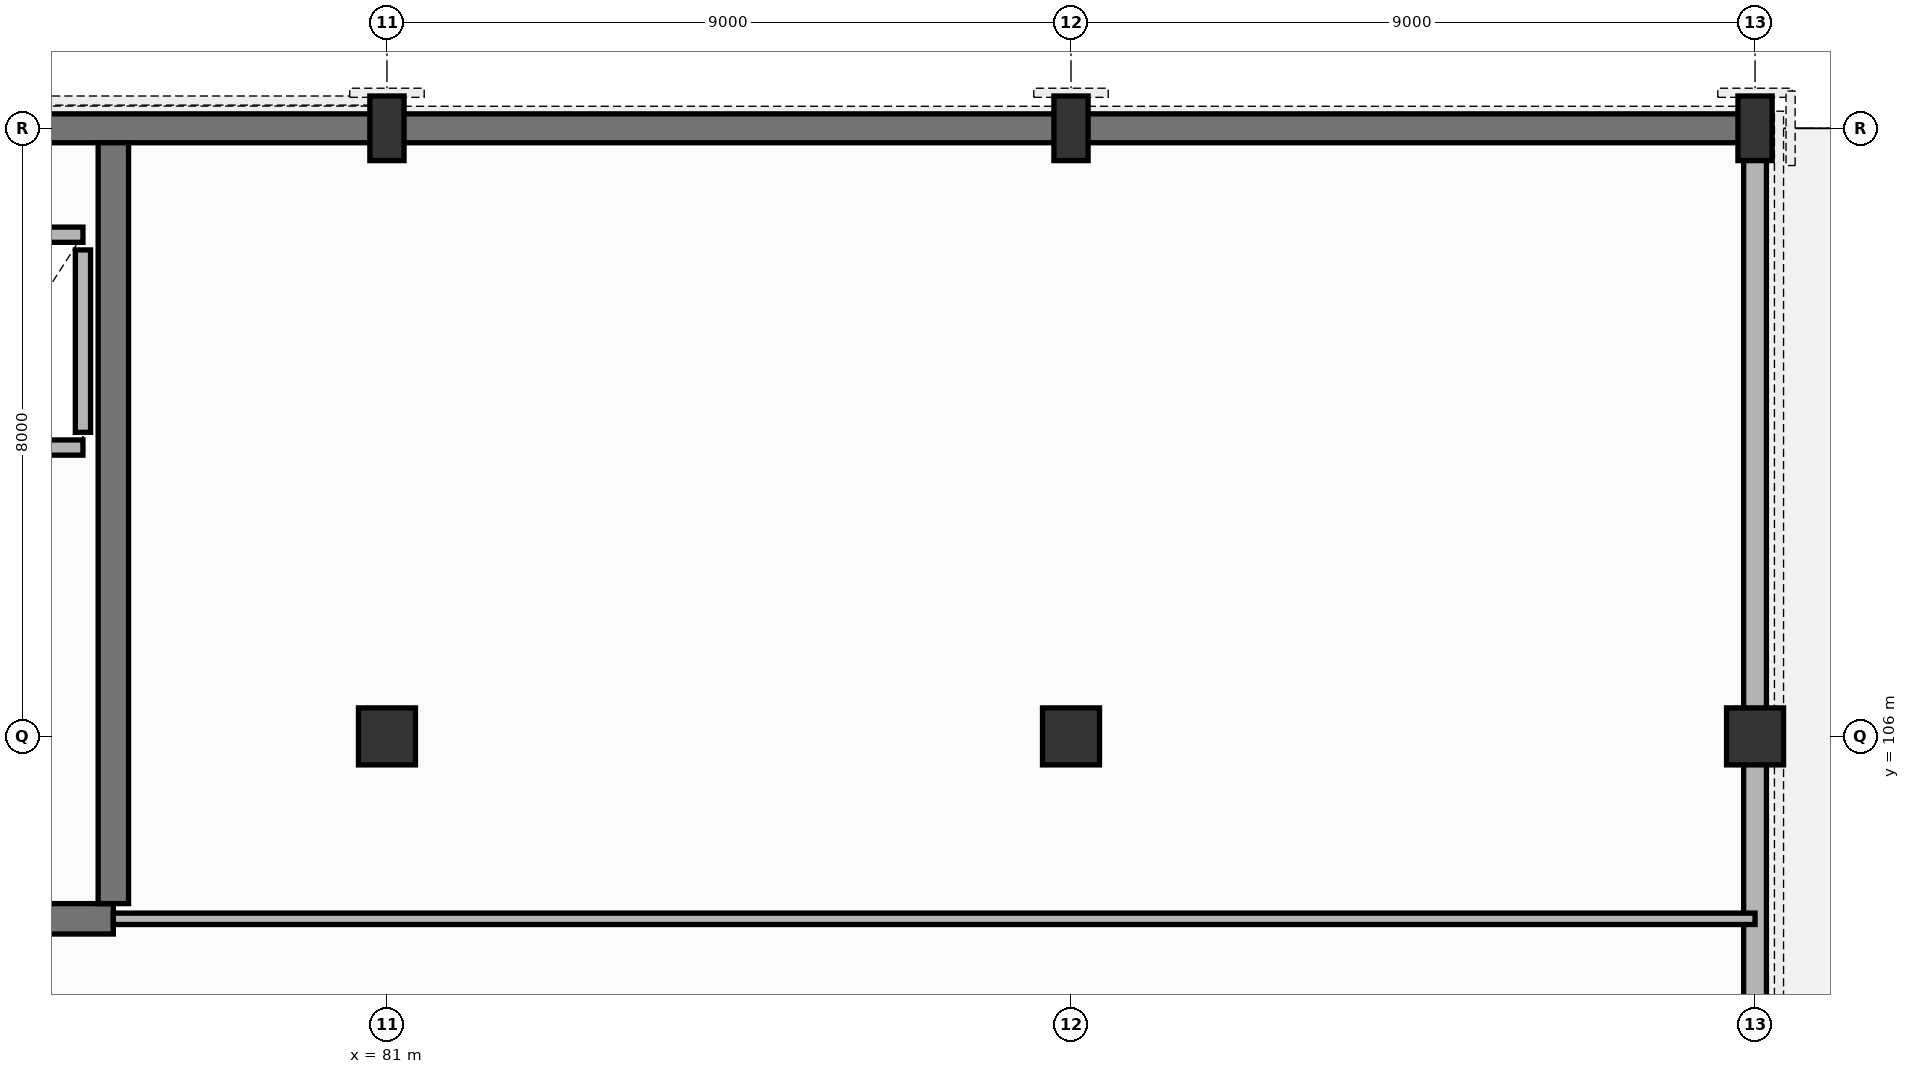
"""IFC4 building model, lengths in metres.
Left out: names, types, materials, properties, quantities, classifications, styles, units other than length and angle.
Written with IfcOpenShell. Run it as: python <this file> out.ifc"""

import sys

from ifc_helpers import new_model, si_unit, direction, frame, frame_2d, origin, origin_2d, place, context, subcontext, project, spatial, rectangle, extrude, element, fill, save


model = new_model("IFC4")
c1 = context("Model", 3, precision=1e-05, world=origin(), true_north=direction((0.0, 1.0)))
c2 = subcontext(c1, "Body", "Model", "MODEL_VIEW")
j1 = project(units=[si_unit("LENGTHUNIT", "METRE"), si_unit("PLANEANGLEUNIT", "RADIAN")], contexts=[c1])
p1 = place(None, origin())
s1 = spatial("IfcSite", under=j1, at=p1, CompositionType="ELEMENT")
p2 = place(p1, origin())
s2 = spatial("IfcBuilding", under=s1, at=p2, CompositionType="ELEMENT")
p3 = place(p2, frame((0.0, 0.0, 8.94)))
s3 = spatial("IfcBuildingStorey", under=s2, at=p3, CompositionType="ELEMENT", Elevation=8.94)
p4 = place(p3, frame((81.0, 106.0, 0.0), z_axis=(0.0, 0.0, 1.0), x_axis=(1.0, 0.0, 0.0)))
e1 = element("IfcColumn", 1, at=p4, inside=s3, PredefinedType="COLUMN", context=c2, shape_type="SweptSolid", body=[
    extrude(rectangle(XDim=0.75, YDim=0.75, at=origin_2d()), origin(), (0.0, 0.0, 1.0), 3.84),
])
p5 = place(p3, frame((81.0, 114.0, 0.0), z_axis=(0.0, 0.0, 1.0), x_axis=(0.0, 1.0, 0.0)))
e2 = element("IfcColumn", 2, at=p5, inside=s3, PredefinedType="COLUMN", context=c2, shape_type="SweptSolid", body=[
    extrude(rectangle(XDim=0.45, YDim=0.85, at=origin_2d()), origin(), (0.0, 0.0, 1.0), 3.84),
])
p6 = place(p3, frame((90.0, 106.0, 0.0), z_axis=(0.0, 0.0, 1.0), x_axis=(1.0, 0.0, 0.0)))
e3 = element("IfcColumn", 3, at=p6, inside=s3, PredefinedType="COLUMN", context=c2, shape_type="SweptSolid", body=[
    extrude(rectangle(XDim=0.75, YDim=0.75, at=origin_2d()), origin(), (0.0, 0.0, 1.0), 3.84),
])
p7 = place(p3, frame((90.0, 114.0, 0.0), z_axis=(0.0, 0.0, 1.0), x_axis=(0.0, 1.0, 0.0)))
e4 = element("IfcColumn", 4, at=p7, inside=s3, PredefinedType="COLUMN", context=c2, shape_type="SweptSolid", body=[
    extrude(rectangle(XDim=0.45, YDim=0.85, at=origin_2d()), origin(), (0.0, 0.0, 1.0), 3.84),
])
p8 = place(p3, frame((99.0, 106.0, 0.0), z_axis=(0.0, 0.0, 1.0), x_axis=(1.0, 0.0, 0.0)))
e5 = element("IfcColumn", 5, at=p8, inside=s3, PredefinedType="COLUMN", context=c2, shape_type="SweptSolid", body=[
    extrude(rectangle(XDim=0.75, YDim=0.75, at=origin_2d()), origin(), (0.0, 0.0, 1.0), 3.84),
])
p9 = place(p3, frame((99.0, 114.0, 0.0), z_axis=(0.0, 0.0, 1.0), x_axis=(0.0, 1.0, 0.0)))
e6 = element("IfcColumn", 6, at=p9, inside=s3, PredefinedType="COLUMN", context=c2, shape_type="SweptSolid", body=[
    extrude(rectangle(XDim=0.45, YDim=0.85, at=origin_2d()), origin(), (0.0, 0.0, 1.0), 3.84),
])
p10 = place(p3, frame((72.0, 114.0, 0.0), z_axis=(0.0, 0.0, 1.0), x_axis=(1.0, 0.0, 0.0)))
e7 = element("IfcWall", 7, at=p10, inside=s3, PredefinedType="SOLIDWALL", context=c2, shape_type="SweptSolid", body=[
    extrude(rectangle(XDim=9.0, YDim=0.38, at=frame_2d((4.5, 0.0))), origin(), (0.0, 0.0, 1.0), 3.53),
])
p11 = place(p3, frame((81.0, 114.0, 0.0), z_axis=(0.0, 0.0, 1.0), x_axis=(1.0, 0.0, 0.0)))
e8 = element("IfcWall", 8, at=p11, inside=s3, PredefinedType="SOLIDWALL", context=c2, shape_type="SweptSolid", body=[
    extrude(rectangle(XDim=9.0, YDim=0.38, at=frame_2d((4.5, 0.0))), origin(), (0.0, 0.0, 1.0), 3.53),
])
p12 = place(p11, frame((2.2, 0.0, 0.615)))
e9 = element("IfcOpeningElement", 9, at=p12, cuts=e8, PredefinedType="OPENING", context=c2, shape_type="SweptSolid", body=[
    extrude(rectangle(XDim=0.82, YDim=2.15, at=frame_2d((0.41, 1.075))), frame((0.0, 0.2, 0.0), z_axis=(0.0, -1.0, 0.0), x_axis=(1.0, 0.0, 0.0)), (0.0, 0.0, 1.0), 0.4),
])
p13 = place(p11, frame((5.4, 0.0, 0.465)))
e10 = element("IfcOpeningElement", 10, at=p13, cuts=e8, PredefinedType="OPENING", context=c2, shape_type="SweptSolid", body=[
    extrude(rectangle(XDim=1.15, YDim=2.3, at=frame_2d((0.575, 1.15))), frame((0.0, 0.2, 0.0), z_axis=(0.0, -1.0, 0.0), x_axis=(1.0, 0.0, 0.0)), (0.0, 0.0, 1.0), 0.4),
])
p14 = place(p3, frame((90.0, 114.0, 0.0), z_axis=(0.0, 0.0, 1.0), x_axis=(1.0, 0.0, 0.0)))
e11 = element("IfcWall", 11, at=p14, inside=s3, PredefinedType="SOLIDWALL", context=c2, shape_type="SweptSolid", body=[
    extrude(rectangle(XDim=9.0, YDim=0.38, at=frame_2d((4.5, 0.0))), origin(), (0.0, 0.0, 1.0), 3.53),
])
p15 = place(p14, frame((2.2, 0.0, 0.605)))
e12 = element("IfcOpeningElement", 12, at=p15, cuts=e11, PredefinedType="OPENING", context=c2, shape_type="SweptSolid", body=[
    extrude(rectangle(XDim=0.82, YDim=2.15, at=frame_2d((0.41, 1.075))), frame((0.0, 0.2, 0.0), z_axis=(0.0, -1.0, 0.0), x_axis=(1.0, 0.0, 0.0)), (0.0, 0.0, 1.0), 0.4),
])
p16 = place(p14, frame((5.4, 0.0, 0.455)))
e13 = element("IfcOpeningElement", 13, at=p16, cuts=e11, PredefinedType="OPENING", context=c2, shape_type="SweptSolid", body=[
    extrude(rectangle(XDim=1.15, YDim=2.3, at=frame_2d((0.575, 1.15))), frame((0.0, 0.2, 0.0), z_axis=(0.0, -1.0, 0.0), x_axis=(1.0, 0.0, 0.0)), (0.0, 0.0, 1.0), 0.4),
])
p17 = place(p3, frame((99.0, 82.2, 0.0), z_axis=(0.0, 0.0, 1.0), x_axis=(0.0, 1.0, 0.0)))
e14 = element("IfcWall", 14, at=p17, inside=s3, PredefinedType="SOLIDWALL", context=c2, shape_type="SweptSolid", body=[
    extrude(rectangle(XDim=31.8, YDim=0.3, at=frame_2d((15.9, 0.0))), origin(), (0.0, 0.0, 1.0), 2.695),
])
p18 = place(p17, frame((18.2, 0.0, 0.0)))
e15 = element("IfcOpeningElement", 15, at=p18, cuts=e14, PredefinedType="OPENING", context=c2, shape_type="SweptSolid", body=[
    extrude(rectangle(XDim=1.6, YDim=2.25, at=frame_2d((0.8, 1.125))), frame((0.0, 0.16, 0.0), z_axis=(0.0, -1.0, 0.0), x_axis=(1.0, 0.0, 0.0)), (0.0, 0.0, 1.0), 0.32),
])
p19 = place(p17, frame((3.2, 0.0, 0.475)))
e16 = element("IfcOpeningElement", 16, at=p19, cuts=e14, PredefinedType="OPENING", context=c2, shape_type="SweptSolid", body=[
    extrude(rectangle(XDim=1.5, YDim=2.1, at=frame_2d((0.75, 1.05))), frame((0.0, 0.16, 0.0), z_axis=(0.0, -1.0, 0.0), x_axis=(1.0, 0.0, 0.0)), (0.0, 0.0, 1.0), 0.32),
])
p20 = place(p17, frame((9.2, 0.0, 0.825)))
e17 = element("IfcOpeningElement", 17, at=p20, cuts=e14, PredefinedType="OPENING", context=c2, shape_type="SweptSolid", body=[
    extrude(rectangle(XDim=1.05, YDim=1.75, at=frame_2d((0.525, 0.875))), frame((0.0, 0.16, 0.0), z_axis=(0.0, -1.0, 0.0), x_axis=(1.0, 0.0, 0.0)), (0.0, 0.0, 1.0), 0.32),
])
p21 = place(p3, frame((64.2, 103.6, 0.0), z_axis=(0.0, 0.0, 1.0), x_axis=(1.0, 0.0, 0.0)))
e18 = element("IfcWall", 18, at=p21, inside=s3, PredefinedType="SHEAR", context=c2, shape_type="SweptSolid", body=[
    extrude(rectangle(XDim=13.2, YDim=0.4, at=frame_2d((6.6, 0.0))), origin(), (0.0, 0.0, 1.0), 3.53),
])
p22 = place(p21, frame((5.8, 0.0, 0.0)))
e19 = element("IfcOpeningElement", 19, at=p22, cuts=e18, PredefinedType="OPENING", context=c2, shape_type="SweptSolid", body=[
    extrude(rectangle(XDim=1.5, YDim=2.2, at=frame_2d((0.75, 1.1))), frame((0.0, 0.21, 0.0), z_axis=(0.0, -1.0, 0.0), x_axis=(1.0, 0.0, 0.0)), (0.0, 0.0, 1.0), 0.42),
])
p23 = place(p3, frame((77.4, 103.8, 0.0), z_axis=(0.0, 0.0, 1.0), x_axis=(0.0, 1.0, 0.0)))
e20 = element("IfcWall", 20, at=p23, inside=s3, PredefinedType="SHEAR", context=c2, shape_type="SweptSolid", body=[
    extrude(rectangle(XDim=10.01, YDim=0.4, at=frame_2d((5.005, 0.0))), origin(), (0.0, 0.0, 1.0), 3.53),
])
p24 = place(p3, frame((75.2, 109.8, 0.0), z_axis=(0.0, 0.0, 1.0), x_axis=(1.0, 0.0, 0.0)))
e21 = element("IfcWall", 21, at=p24, inside=s3, PredefinedType="PARTITIONING", context=c2, shape_type="SweptSolid", body=[
    extrude(rectangle(XDim=1.8, YDim=0.2, at=frame_2d((0.9, 0.0))), origin(), (0.0, 0.0, 1.0), 3.53),
])
p25 = place(p24, frame((0.45, 0.0, 0.0)))
e22 = element("IfcOpeningElement", 22, at=p25, cuts=e21, PredefinedType="OPENING", context=c2, shape_type="SweptSolid", body=[
    extrude(rectangle(XDim=0.9, YDim=2.1, at=frame_2d((0.45, 1.05))), frame((0.0, 0.11, 0.0), z_axis=(0.0, -1.0, 0.0), x_axis=(1.0, 0.0, 0.0)), (0.0, 0.0, 1.0), 0.22),
])
p26 = place(p3, frame((75.2, 112.6, 0.0), z_axis=(0.0, 0.0, 1.0), x_axis=(1.0, 0.0, 0.0)))
e23 = element("IfcWall", 23, at=p26, inside=s3, PredefinedType="PARTITIONING", context=c2, shape_type="SweptSolid", body=[
    extrude(rectangle(XDim=1.8, YDim=0.2, at=frame_2d((0.9, 0.0))), origin(), (0.0, 0.0, 1.0), 3.53),
])
p27 = place(p3, frame((77.0, 110.0, 0.0), z_axis=(0.0, 0.0, 1.0), x_axis=(0.0, 1.0, 0.0)))
e24 = element("IfcWall", 24, at=p27, inside=s3, PredefinedType="PARTITIONING", context=c2, shape_type="SweptSolid", body=[
    extrude(rectangle(XDim=2.4, YDim=0.2, at=frame_2d((1.2, 0.0))), origin(), (0.0, 0.0, 1.0), 3.53),
])
p28 = place(p3, frame((77.4, 103.6, 0.0), z_axis=(0.0, 0.0, 1.0), x_axis=(1.0, 0.0, 0.0)))
e25 = element("IfcWall", 25, at=p28, inside=s3, PredefinedType="PARTITIONING", context=c2, shape_type="SweptSolid", body=[
    extrude(rectangle(XDim=21.6, YDim=0.15, at=frame_2d((10.8, 0.0))), origin(), (0.0, 0.0, 1.0), 3.53),
])
p29 = place(p28, frame((10.1, 0.0, 0.0)))
e26 = element("IfcOpeningElement", 26, at=p29, cuts=e25, PredefinedType="OPENING", context=c2, shape_type="SweptSolid", body=[
    extrude(rectangle(XDim=1.0, YDim=2.15, at=frame_2d((0.5, 1.075))), frame((0.0, 0.085, 0.0), z_axis=(0.0, -1.0, 0.0), x_axis=(1.0, 0.0, 0.0)), (0.0, 0.0, 1.0), 0.17),
])
p30 = place(p12, origin())
e27 = element("IfcWindow", 27, at=p30, inside=s3, PartitioningType="SINGLE_PANEL", PredefinedType="WINDOW", context=c2, shape_type="SweptSolid", body=[
    extrude(rectangle(XDim=0.82, YDim=2.15, at=frame_2d((0.41, 1.075))), frame((0.0, 0.03, 0.0), z_axis=(0.0, -1.0, 0.0), x_axis=(1.0, 0.0, 0.0)), (0.0, 0.0, 1.0), 0.06),
])
fill(e9, e27)
p31 = place(p13, origin())
e28 = element("IfcWindow", 28, at=p31, inside=s3, PartitioningType="SINGLE_PANEL", PredefinedType="WINDOW", context=c2, shape_type="SweptSolid", body=[
    extrude(rectangle(XDim=1.15, YDim=2.3, at=frame_2d((0.575, 1.15))), frame((0.0, 0.03, 0.0), z_axis=(0.0, -1.0, 0.0), x_axis=(1.0, 0.0, 0.0)), (0.0, 0.0, 1.0), 0.06),
])
fill(e10, e28)
p32 = place(p15, origin())
e29 = element("IfcWindow", 29, at=p32, inside=s3, PartitioningType="SINGLE_PANEL", PredefinedType="WINDOW", context=c2, shape_type="SweptSolid", body=[
    extrude(rectangle(XDim=0.82, YDim=2.15, at=frame_2d((0.41, 1.075))), frame((0.0, 0.03, 0.0), z_axis=(0.0, -1.0, 0.0), x_axis=(1.0, 0.0, 0.0)), (0.0, 0.0, 1.0), 0.06),
])
fill(e12, e29)
p33 = place(p16, origin())
e30 = element("IfcWindow", 30, at=p33, inside=s3, PartitioningType="SINGLE_PANEL", PredefinedType="WINDOW", context=c2, shape_type="SweptSolid", body=[
    extrude(rectangle(XDim=1.15, YDim=2.3, at=frame_2d((0.575, 1.15))), frame((0.0, 0.03, 0.0), z_axis=(0.0, -1.0, 0.0), x_axis=(1.0, 0.0, 0.0)), (0.0, 0.0, 1.0), 0.06),
])
fill(e13, e30)
p34 = place(p29, origin())
e31 = element("IfcDoor", 31, at=p34, inside=s3, OperationType="SINGLE_SWING_LEFT", PredefinedType="DOOR", context=c2, shape_type="SweptSolid", body=[
    extrude(rectangle(XDim=1.0, YDim=2.15, at=frame_2d((0.5, 1.075))), frame((0.0, 0.025, 0.0), z_axis=(0.0, -1.0, 0.0), x_axis=(1.0, 0.0, 0.0)), (0.0, 0.0, 1.0), 0.05),
])
fill(e26, e31)
save(model, sys.argv[1])
